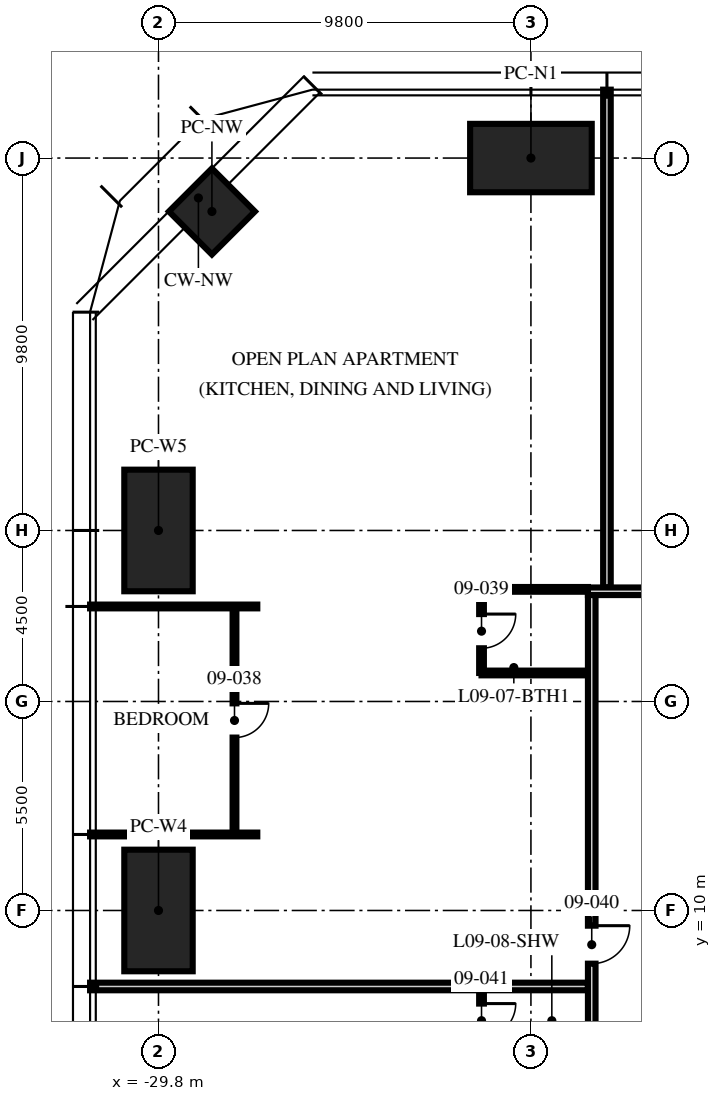
"""IFC4 building model, lengths in metres.
Left out: names, types, materials, properties, quantities, classifications, styles, units other than length and angle.
Written with IfcOpenShell. Run it as: python <this file> out.ifc"""

import sys

from ifc_helpers import new_model, si_unit, direction, frame, frame_2d, origin, origin_2d, place, context, subcontext, project, spatial, rectangle, hollow_rectangle, extrude, element, fill, save


model = new_model("IFC4")
c1 = context("Model", 3, precision=1e-05, world=origin(), true_north=direction((0.0, 1.0)))
c2 = subcontext(c1, "Body", "Model", "MODEL_VIEW")
j1 = project(units=[si_unit("LENGTHUNIT", "METRE"), si_unit("PLANEANGLEUNIT", "RADIAN")], contexts=[c1])
p1 = place(None, origin())
s1 = spatial("IfcSite", under=j1, at=p1, CompositionType="ELEMENT")
p2 = place(p1, origin())
s2 = spatial("IfcBuilding", under=s1, at=p2, CompositionType="ELEMENT")
p3 = place(p2, frame((0.0, 0.0, 39.75)))
s3 = spatial("IfcBuildingStorey", under=s2, at=p3, CompositionType="ELEMENT", Elevation=39.75)
for number, where, z_axis, x_axis in (
    (1, (-20.0, 29.8, 0.0), (0.0, 0.0, 1.0), (1.0, 0.0, 0.0)),
    (2, (-29.8, 10.0, 0.0), (0.0, 0.0, 1.0), (0.0, 1.0, 0.0)),
    (3, (-29.8, 20.0, 0.0), (0.0, 0.0, 1.0), (0.0, 1.0, 0.0)),
):
    element("IfcColumn", number, at=place(p3, frame(where, z_axis=z_axis, x_axis=x_axis)), inside=s3, PredefinedType="COLUMN", context=c2, shape_type="SweptSolid", body=[
        extrude(hollow_rectangle(XDim=3.2, YDim=1.8, WallThickness=0.2, at=origin_2d()), origin(), (0.0, 0.0, 1.0), 3.75),
    ])
p4 = place(p3, frame((-28.394, 28.394, 0.0), z_axis=(0.0, 0.0, 1.0), x_axis=(0.707106781187, 0.707106781187, 0.0)))
e4 = element("IfcColumn", 4, at=p4, inside=s3, PredefinedType="COLUMN", context=c2, shape_type="SweptSolid", body=[
    extrude(hollow_rectangle(XDim=1.6, YDim=1.6, WallThickness=0.1, at=origin_2d()), origin(), (0.0, 0.0, 1.0), 3.75),
])
p5 = place(p3, frame((-18.0, 18.5, 0.0), z_axis=(0.0, 0.0, 1.0), x_axis=(0.0, 1.0, 0.0)))
e5 = element("IfcWall", 5, at=p5, inside=s3, PredefinedType="PARTITIONING", context=c2, shape_type="SweptSolid", body=[
    extrude(rectangle(XDim=13.1, YDim=0.2, at=frame_2d((6.55, 0.0))), origin(), (0.0, 0.0, 1.0), 2.3),
])
for number, where, z_axis, x_axis in (
    (6, (-27.2, 18.0, 0.0), (0.0, 0.0, 1.0), (-1.0, 0.0, 0.0)),
    (7, (-27.2, 12.0, 0.0), (0.0, 0.0, 1.0), (-1.0, 0.0, 0.0)),
):
    element("IfcWall", number, at=place(p3, frame(where, z_axis=z_axis, x_axis=x_axis)), inside=s3, PredefinedType="PARTITIONING", context=c2, shape_type="SweptSolid", body=[
        extrude(rectangle(XDim=4.4, YDim=0.1, at=frame_2d((2.2, 0.0))), origin(), (0.0, 0.0, 1.0), 2.71),
    ])
p6 = place(p3, frame((-18.5, 8.0, 0.0), z_axis=(0.0, 0.0, 1.0), x_axis=(-1.0, 0.0, 0.0)))
e8 = element("IfcWall", 8, at=p6, inside=s3, PredefinedType="PARTITIONING", context=c2, shape_type="SweptSolid", body=[
    extrude(rectangle(XDim=13.1, YDim=0.2, at=frame_2d((6.55, 0.0))), origin(), (0.0, 0.0, 1.0), 2.71),
])
p7 = place(p3, frame((-27.8, 18.0, 0.0), z_axis=(0.0, 0.0, 1.0), x_axis=(0.0, -1.0, 0.0)))
e9 = element("IfcWall", 9, at=p7, inside=s3, PredefinedType="PARTITIONING", context=c2, shape_type="SweptSolid", body=[
    extrude(rectangle(XDim=6.0, YDim=0.1, at=frame_2d((3.0, 0.0))), origin(), (0.0, 0.0, 1.0), 2.61),
])
p8 = place(p7, frame((2.55, 0.0, 0.0)))
e10 = element("IfcOpeningElement", 10, at=p8, cuts=e9, PredefinedType="OPENING", context=c2, shape_type="SweptSolid", body=[
    extrude(rectangle(XDim=0.9, YDim=2.1, at=frame_2d((0.45, 1.05))), frame((0.0, 0.06, 0.0), z_axis=(0.0, -1.0, 0.0), x_axis=(1.0, 0.0, 0.0)), (0.0, 0.0, 1.0), 0.12),
])
p9 = place(p3, frame((-21.3, 18.45, 0.0), z_axis=(0.0, 0.0, 1.0), x_axis=(0.0, -1.0, 0.0)))
e11 = element("IfcWall", 11, at=p9, inside=s3, PredefinedType="PARTITIONING", context=c2, shape_type="SweptSolid", body=[
    extrude(rectangle(XDim=2.2, YDim=0.125, at=frame_2d((1.1, 0.0))), origin(), (0.0, 0.0, 1.0), 3.5),
])
p10 = place(p9, frame((0.65, 0.0, 0.0)))
e12 = element("IfcOpeningElement", 12, at=p10, cuts=e11, PredefinedType="OPENING", context=c2, shape_type="SweptSolid", body=[
    extrude(rectangle(XDim=0.9, YDim=2.1, at=frame_2d((0.45, 1.05))), frame((0.0, 0.073, 0.0), z_axis=(0.0, -1.0, 0.0), x_axis=(1.0, 0.0, 0.0)), (0.0, 0.0, 1.0), 0.145),
])
p11 = place(p3, frame((-18.5, 18.45, 0.0), z_axis=(0.0, 0.0, 1.0), x_axis=(-1.0, 0.0, 0.0)))
e13 = element("IfcWall", 13, at=p11, inside=s3, PredefinedType="PARTITIONING", context=c2, shape_type="SweptSolid", body=[
    extrude(rectangle(XDim=2.8, YDim=0.125, at=frame_2d((1.4, 0.0))), origin(), (0.0, 0.0, 1.0), 2.3),
])
p12 = place(p3, frame((-18.5, 16.25, 0.0), z_axis=(0.0, 0.0, 1.0), x_axis=(-1.0, 0.0, 0.0)))
e14 = element("IfcWall", 14, at=p12, inside=s3, PredefinedType="PARTITIONING", context=c2, shape_type="SweptSolid", body=[
    extrude(rectangle(XDim=2.8, YDim=0.125, at=frame_2d((1.4, 0.0))), origin(), (0.0, 0.0, 1.0), 3.5),
])
p13 = place(p3, frame((-21.3, 8.0, 0.0), z_axis=(0.0, 0.0, 1.0), x_axis=(0.0, -1.0, 0.0)))
e15 = element("IfcWall", 15, at=p13, inside=s3, PredefinedType="PARTITIONING", context=c2, shape_type="SweptSolid", body=[
    extrude(rectangle(XDim=1.8, YDim=0.125, at=frame_2d((0.9, 0.0))), origin(), (0.0, 0.0, 1.0), 3.5),
])
p14 = place(p13, frame((0.45, 0.0, 0.0)))
e16 = element("IfcOpeningElement", 16, at=p14, cuts=e15, PredefinedType="OPENING", context=c2, shape_type="SweptSolid", body=[
    extrude(rectangle(XDim=0.9, YDim=2.1, at=frame_2d((0.45, 1.05))), frame((0.0, 0.073, 0.0), z_axis=(0.0, -1.0, 0.0), x_axis=(1.0, 0.0, 0.0)), (0.0, 0.0, 1.0), 0.145),
])
p15 = place(p3, frame((-18.5, 18.4, 0.0), z_axis=(0.0, 0.0, 1.0), x_axis=(1.0, 0.0, 0.0)))
e17 = element("IfcWall", 17, at=p15, inside=s3, PredefinedType="PARTITIONING", context=c2, shape_type="SweptSolid", body=[
    extrude(rectangle(XDim=4.5, YDim=0.2, at=frame_2d((2.25, 0.0))), origin(), (0.0, 0.0, 1.0), 2.3),
])
p16 = place(p3, frame((-18.4, 18.3, 0.0), z_axis=(0.0, 0.0, 1.0), x_axis=(0.0, -1.0, 0.0)))
e18 = element("IfcWall", 18, at=p16, inside=s3, PredefinedType="PARTITIONING", context=c2, shape_type="SweptSolid", body=[
    extrude(rectangle(XDim=36.6, YDim=0.2, at=frame_2d((18.3, 0.0))), origin(), (0.0, 0.0, 1.0), 2.3),
])
p17 = place(p16, frame((8.7, 0.0, 0.0)))
e19 = element("IfcOpeningElement", 19, at=p17, cuts=e18, PredefinedType="OPENING", context=c2, shape_type="SweptSolid", body=[
    extrude(rectangle(XDim=1.0, YDim=2.2, at=frame_2d((0.5, 1.1))), frame((0.0, 0.11, 0.0), z_axis=(0.0, -1.0, 0.0), x_axis=(1.0, 0.0, 0.0)), (0.0, 0.0, 1.0), 0.22),
])
p18 = place(p16, frame((14.87, 0.0, 0.0)))
e20 = element("IfcOpeningElement", 20, at=p18, cuts=e18, PredefinedType="OPENING", context=c2, shape_type="SweptSolid", body=[
    extrude(rectangle(XDim=1.0, YDim=2.2, at=frame_2d((0.5, 1.1))), frame((0.0, 0.11, 0.0), z_axis=(0.0, -1.0, 0.0), x_axis=(1.0, 0.0, 0.0)), (0.0, 0.0, 1.0), 0.22),
])
p19 = place(p16, frame((34.82, 0.0, 0.0)))
e21 = element("IfcOpeningElement", 21, at=p19, cuts=e18, PredefinedType="OPENING", context=c2, shape_type="SweptSolid", body=[
    extrude(rectangle(XDim=1.0, YDim=2.2, at=frame_2d((0.5, 1.1))), frame((0.0, 0.11, 0.0), z_axis=(0.0, -1.0, 0.0), x_axis=(1.0, 0.0, 0.0)), (0.0, 0.0, 1.0), 0.22),
])
p20 = place(p8, origin())
e22 = element("IfcDoor", 22, at=p20, inside=s3, OperationType="SINGLE_SWING_LEFT", PredefinedType="DOOR", context=c2, shape_type="SweptSolid", body=[
    extrude(rectangle(XDim=0.9, YDim=2.1, at=frame_2d((0.45, 1.05))), frame((0.0, 0.025, 0.0), z_axis=(0.0, -1.0, 0.0), x_axis=(1.0, 0.0, 0.0)), (0.0, 0.0, 1.0), 0.05),
])
fill(e10, e22)
p21 = place(p10, origin())
e23 = element("IfcDoor", 23, at=p21, inside=s3, OperationType="SINGLE_SWING_LEFT", PredefinedType="DOOR", context=c2, shape_type="SweptSolid", body=[
    extrude(rectangle(XDim=0.9, YDim=2.1, at=frame_2d((0.45, 1.05))), frame((0.0, 0.025, 0.0), z_axis=(0.0, -1.0, 0.0), x_axis=(1.0, 0.0, 0.0)), (0.0, 0.0, 1.0), 0.05),
])
fill(e12, e23)
p22 = place(p17, origin())
e24 = element("IfcDoor", 24, at=p22, inside=s3, OperationType="SINGLE_SWING_LEFT", PredefinedType="DOOR", context=c2, shape_type="SweptSolid", body=[
    extrude(rectangle(XDim=1.0, YDim=2.2, at=frame_2d((0.5, 1.1))), frame((0.0, 0.025, 0.0), z_axis=(0.0, -1.0, 0.0), x_axis=(1.0, 0.0, 0.0)), (0.0, 0.0, 1.0), 0.05),
])
fill(e19, e24)
p23 = place(p14, origin())
e25 = element("IfcDoor", 25, at=p23, inside=s3, OperationType="SINGLE_SWING_LEFT", PredefinedType="DOOR", context=c2, shape_type="SweptSolid", body=[
    extrude(rectangle(XDim=0.9, YDim=2.1, at=frame_2d((0.45, 1.05))), frame((0.0, 0.025, 0.0), z_axis=(0.0, -1.0, 0.0), x_axis=(1.0, 0.0, 0.0)), (0.0, 0.0, 1.0), 0.05),
])
fill(e16, e25)
save(model, sys.argv[1])
